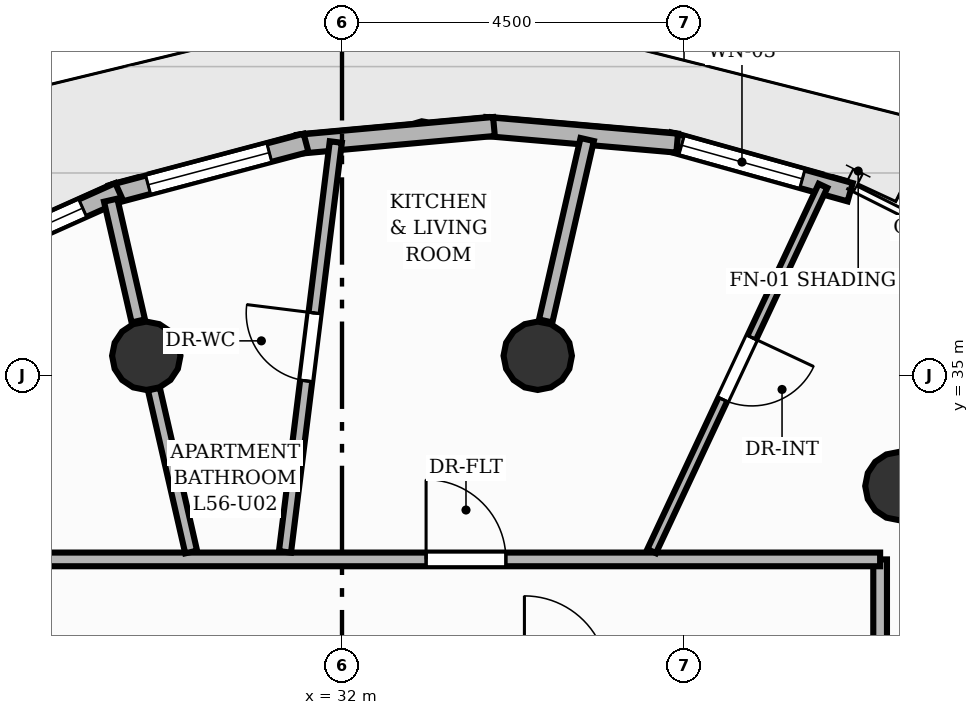
"""IFC4 building model, lengths in metres.
Left out: names, types, materials, properties, quantities, classifications, styles, units other than length and angle.
Written with IfcOpenShell. Run it as: python <this file> out.ifc"""

import sys

from ifc_helpers import new_model, si_unit, direction, frame, frame_2d, origin, origin_2d, place, context, subcontext, project, spatial, rectangle, circle, extrude, element, fill, save


model = new_model("IFC4")
c1 = context("Model", 3, precision=1e-05, world=origin(), true_north=direction((0.0, 1.0)))
c2 = subcontext(c1, "Body", "Model", "MODEL_VIEW")
j1 = project(units=[si_unit("LENGTHUNIT", "METRE"), si_unit("PLANEANGLEUNIT", "RADIAN")], contexts=[c1])
p1 = place(None, origin())
s1 = spatial("IfcSite", under=j1, at=p1, CompositionType="ELEMENT")
p2 = place(p1, origin())
s2 = spatial("IfcBuilding", under=s1, at=p2, CompositionType="ELEMENT")
p3 = place(p2, frame((0.0, 0.0, 188.64)))
s3 = spatial("IfcBuildingStorey", under=s2, at=p3, CompositionType="ELEMENT", Elevation=188.64)
for number, where, z_axis, x_axis in (
    (1, (39.333, 33.545, 0.0), (0.0, 0.0, 1.0), (1.0, 0.0, 0.0)),
    (2, (34.575, 35.26, 0.0), (0.0, 0.0, 1.0), (1.0, 0.0, 0.0)),
    (3, (29.425, 35.26, 0.0), (0.0, 0.0, 1.0), (1.0, 0.0, 0.0)),
):
    element("IfcColumn", number, at=place(p3, frame(where, z_axis=z_axis, x_axis=x_axis)), inside=s3, PredefinedType="COLUMN", context=c2, shape_type="SweptSolid", body=[
        extrude(circle(Radius=0.45, at=origin_2d()), origin(), (0.0, 0.0, 1.0), 3.2),
    ])
p4 = place(p3, frame((36.299, 38.077, 0.0), z_axis=(0.0, 0.0, 1.0), x_axis=(0.96316841201, -0.26889888454, 0.0)))
e4 = element("IfcWall", 4, at=p4, inside=s3, PredefinedType="SOLIDWALL", context=c2, shape_type="SweptSolid", body=[
    extrude(rectangle(XDim=2.478, YDim=0.25, at=frame_2d((1.239, 0.0))), origin(), (0.0, 0.0, 1.0), 2.96),
])
p5 = place(p4, frame((0.175, 0.0, 0.85)))
e5 = element("IfcOpeningElement", 5, at=p5, cuts=e4, PredefinedType="OPENING", context=c2, shape_type="SweptSolid", body=[
    extrude(rectangle(XDim=1.65, YDim=1.55, at=frame_2d((0.825, 0.775))), frame((0.0, 0.135, 0.0), z_axis=(0.0, -1.0, 0.0), x_axis=(1.0, 0.0, 0.0)), (0.0, 0.0, 1.0), 0.27),
])
p6 = place(p3, frame((33.888, 38.276, 0.0), z_axis=(0.0, 0.0, 1.0), x_axis=(0.996260822813, -0.08639660252, 0.0)))
e6 = element("IfcWall", 6, at=p6, inside=s3, PredefinedType="SOLIDWALL", context=c2, shape_type="SweptSolid", body=[
    extrude(rectangle(XDim=2.532, YDim=0.25, at=frame_2d((1.266, 0.0))), origin(), (0.0, 0.0, 1.0), 2.96),
])
p7 = place(p3, frame((31.418, 38.042, 0.0), z_axis=(0.0, 0.0, 1.0), x_axis=(0.995895522128, 0.090510270169, 0.0)))
e7 = element("IfcWall", 7, at=p7, inside=s3, PredefinedType="SOLIDWALL", context=c2, shape_type="SweptSolid", body=[
    extrude(rectangle(XDim=2.592, YDim=0.25, at=frame_2d((1.296, 0.0))), origin(), (0.0, 0.0, 1.0), 2.96),
])
p8 = place(p3, frame((28.965, 37.381, 0.0), z_axis=(0.0, 0.0, 1.0), x_axis=(0.96652474621, 0.256573410476, 0.0)))
e8 = element("IfcWall", 8, at=p8, inside=s3, PredefinedType="SOLIDWALL", context=c2, shape_type="SweptSolid", body=[
    extrude(rectangle(XDim=2.651, YDim=0.25, at=frame_2d((1.325, 0.0))), origin(), (0.0, 0.0, 1.0), 2.96),
])
p9 = place(p8, frame((0.501, 0.0, 0.85)))
e9 = element("IfcOpeningElement", 9, at=p9, cuts=e8, PredefinedType="OPENING", context=c2, shape_type="SweptSolid", body=[
    extrude(rectangle(XDim=1.65, YDim=1.55, at=frame_2d((0.825, 0.775))), frame((0.0, 0.135, 0.0), z_axis=(0.0, -1.0, 0.0), x_axis=(1.0, 0.0, 0.0)), (0.0, 0.0, 1.0), 0.27),
])
p10 = place(p3, frame((26.603, 36.313, 0.0), z_axis=(0.0, 0.0, 1.0), x_axis=(0.912615139532, 0.408819773368, 0.0)))
e10 = element("IfcWall", 10, at=p10, inside=s3, PredefinedType="SOLIDWALL", context=c2, shape_type="SweptSolid", body=[
    extrude(rectangle(XDim=2.702, YDim=0.25, at=frame_2d((1.351, 0.0))), origin(), (0.0, 0.0, 1.0), 2.96),
])
p11 = place(p10, frame((0.526, 0.0, 0.85)))
e11 = element("IfcOpeningElement", 11, at=p11, cuts=e10, PredefinedType="OPENING", context=c2, shape_type="SweptSolid", body=[
    extrude(rectangle(XDim=1.65, YDim=1.55, at=frame_2d((0.825, 0.775))), frame((0.0, 0.135, 0.0), z_axis=(0.0, -1.0, 0.0), x_axis=(1.0, 0.0, 0.0)), (0.0, 0.0, 1.0), 0.27),
])
p12 = place(p3, frame((34.68, 35.718, 0.0), z_axis=(0.0, 0.0, 1.0), x_axis=(0.222943921747, 0.974831271429, 0.0)))
e12 = element("IfcWall", 12, at=p12, inside=s3, PredefinedType="PARTITIONING", context=c2, shape_type="SweptSolid", body=[
    extrude(rectangle(XDim=2.448, YDim=0.18, at=frame_2d((1.224, 0.0))), origin(), (0.0, 0.0, 1.0), 2.404),
])
p13 = place(p3, frame((29.32, 35.718, 0.0), z_axis=(0.0, 0.0, 1.0), x_axis=(-0.222967107114, 0.974825968645, 0.0)))
e13 = element("IfcWall", 13, at=p13, inside=s3, PredefinedType="PARTITIONING", context=c2, shape_type="SweptSolid", body=[
    extrude(rectangle(XDim=1.63, YDim=0.18, at=frame_2d((0.815, 0.0))), origin(), (0.0, 0.0, 1.0), 2.404),
])
p14 = place(p3, frame((39.08, 32.58, 0.0), z_axis=(0.0, 0.0, 1.0), x_axis=(0.0, -1.0, 0.0)))
e14 = element("IfcWall", 14, at=p14, inside=s3, PredefinedType="PARTITIONING", context=c2, shape_type="SweptSolid", body=[
    extrude(rectangle(XDim=8.094, YDim=0.18, at=frame_2d((4.047, 0.0))), origin(), (0.0, 0.0, 1.0), 2.955),
])
p15 = place(p14, frame((5.174, 0.0, 0.0)))
e15 = element("IfcOpeningElement", 15, at=p15, cuts=e14, PredefinedType="OPENING", context=c2, shape_type="SweptSolid", body=[
    extrude(rectangle(XDim=0.9, YDim=2.1, at=frame_2d((0.45, 1.05))), frame((0.0, 0.1, 0.0), z_axis=(0.0, -1.0, 0.0), x_axis=(1.0, 0.0, 0.0)), (0.0, 0.0, 1.0), 0.2),
])
p16 = place(p3, frame((24.92, 32.58, 0.0), z_axis=(0.0, 0.0, 1.0), x_axis=(1.0, 0.0, 0.0)))
e16 = element("IfcWall", 16, at=p16, inside=s3, PredefinedType="PARTITIONING", context=c2, shape_type="SweptSolid", body=[
    extrude(rectangle(XDim=14.16, YDim=0.18, at=frame_2d((7.08, 0.0))), origin(), (0.0, 0.0, 1.0), 2.955),
])
p17 = place(p16, frame((8.186, 0.0, 0.0)))
e17 = element("IfcOpeningElement", 17, at=p17, cuts=e16, PredefinedType="OPENING", context=c2, shape_type="SweptSolid", body=[
    extrude(rectangle(XDim=1.05, YDim=2.15, at=frame_2d((0.525, 1.075))), frame((0.0, 0.1, 0.0), z_axis=(0.0, -1.0, 0.0), x_axis=(1.0, 0.0, 0.0)), (0.0, 0.0, 1.0), 0.2),
])
p18 = place(p16, frame((2.119, 0.0, 0.0)))
e18 = element("IfcOpeningElement", 18, at=p18, cuts=e16, PredefinedType="OPENING", context=c2, shape_type="SweptSolid", body=[
    extrude(rectangle(XDim=0.9, YDim=2.1, at=frame_2d((0.45, 1.05))), frame((0.0, 0.1, 0.0), z_axis=(0.0, -1.0, 0.0), x_axis=(1.0, 0.0, 0.0)), (0.0, 0.0, 1.0), 0.2),
])
p19 = place(p3, frame((31.25, 32.679, 0.0), z_axis=(0.0, 0.0, 1.0), x_axis=(0.123100196343, 0.992394247091, 0.0)))
e19 = element("IfcWall", 19, at=p19, inside=s3, PredefinedType="PLUMBINGWALL", context=c2, shape_type="SweptSolid", body=[
    extrude(rectangle(XDim=5.434, YDim=0.16, at=frame_2d((2.717, 0.0))), origin(), (0.0, 0.0, 1.0), 2.692),
])
p20 = place(p19, frame((2.267, 0.0, 0.0)))
e20 = element("IfcOpeningElement", 20, at=p20, cuts=e19, PredefinedType="OPENING", context=c2, shape_type="SweptSolid", body=[
    extrude(rectangle(XDim=0.9, YDim=2.1, at=frame_2d((0.45, 1.05))), frame((0.0, 0.09, 0.0), z_axis=(0.0, -1.0, 0.0), x_axis=(1.0, 0.0, 0.0)), (0.0, 0.0, 1.0), 0.18),
])
p21 = place(p3, frame((38.328, 37.496, 0.0), z_axis=(0.0, 0.0, 1.0), x_axis=(-0.424538730781, -0.905409777983, 0.0)))
e21 = element("IfcWall", 21, at=p21, inside=s3, PredefinedType="PARTITIONING", context=c2, shape_type="SweptSolid", body=[
    extrude(rectangle(XDim=5.309, YDim=0.125, at=frame_2d((2.655, 0.0))), origin(), (0.0, 0.0, 1.0), 2.955),
])
p22 = place(p21, frame((2.205, 0.0, 0.0)))
e22 = element("IfcOpeningElement", 22, at=p22, cuts=e21, PredefinedType="OPENING", context=c2, shape_type="SweptSolid", body=[
    extrude(rectangle(XDim=0.9, YDim=2.1, at=frame_2d((0.45, 1.05))), frame((0.0, 0.073, 0.0), z_axis=(0.0, -1.0, 0.0), x_axis=(1.0, 0.0, 0.0)), (0.0, 0.0, 1.0), 0.145),
])
p23 = place(p3, frame((30.015, 32.677, 0.0), z_axis=(0.0, 0.0, 1.0), x_axis=(-0.222969522248, 0.974825416241, 0.0)))
e23 = element("IfcWall", 23, at=p23, inside=s3, PredefinedType="PLUMBINGWALL", context=c2, shape_type="SweptSolid", body=[
    extrude(rectangle(XDim=2.199, YDim=0.16, at=frame_2d((1.099, 0.0))), origin(), (0.0, 0.0, 1.0), 2.404),
])
p24 = place(p5, origin())
e24 = element("IfcWindow", 24, at=p24, inside=s3, PartitioningType="SINGLE_PANEL", PredefinedType="WINDOW", context=c2, shape_type="SweptSolid", body=[
    extrude(rectangle(XDim=1.65, YDim=1.55, at=frame_2d((0.825, 0.775))), frame((0.0, 0.03, 0.0), z_axis=(0.0, -1.0, 0.0), x_axis=(1.0, 0.0, 0.0)), (0.0, 0.0, 1.0), 0.06),
])
fill(e5, e24)
p25 = place(p9, origin())
e25 = element("IfcWindow", 25, at=p25, inside=s3, PartitioningType="SINGLE_PANEL", PredefinedType="WINDOW", context=c2, shape_type="SweptSolid", body=[
    extrude(rectangle(XDim=1.65, YDim=1.55, at=frame_2d((0.825, 0.775))), frame((0.0, 0.03, 0.0), z_axis=(0.0, -1.0, 0.0), x_axis=(1.0, 0.0, 0.0)), (0.0, 0.0, 1.0), 0.06),
])
fill(e9, e25)
p26 = place(p11, origin())
e26 = element("IfcWindow", 26, at=p26, inside=s3, PartitioningType="SINGLE_PANEL", PredefinedType="WINDOW", context=c2, shape_type="SweptSolid", body=[
    extrude(rectangle(XDim=1.65, YDim=1.55, at=frame_2d((0.825, 0.775))), frame((0.0, 0.03, 0.0), z_axis=(0.0, -1.0, 0.0), x_axis=(1.0, 0.0, 0.0)), (0.0, 0.0, 1.0), 0.06),
])
fill(e11, e26)
p27 = place(p17, origin())
e27 = element("IfcDoor", 27, at=p27, inside=s3, OperationType="SINGLE_SWING_LEFT", PredefinedType="DOOR", context=c2, shape_type="SweptSolid", body=[
    extrude(rectangle(XDim=1.05, YDim=2.15, at=frame_2d((0.525, 1.075))), frame((0.0, 0.025, 0.0), z_axis=(0.0, -1.0, 0.0), x_axis=(1.0, 0.0, 0.0)), (0.0, 0.0, 1.0), 0.05),
])
fill(e17, e27)
p28 = place(p20, origin())
e28 = element("IfcDoor", 28, at=p28, inside=s3, OperationType="SINGLE_SWING_RIGHT", PredefinedType="DOOR", context=c2, shape_type="SweptSolid", body=[
    extrude(rectangle(XDim=0.9, YDim=2.1, at=frame_2d((0.45, 1.05))), frame((0.0, 0.025, 0.0), z_axis=(0.0, -1.0, 0.0), x_axis=(1.0, 0.0, 0.0)), (0.0, 0.0, 1.0), 0.05),
])
fill(e20, e28)
p29 = place(p22, origin())
e29 = element("IfcDoor", 29, at=p29, inside=s3, OperationType="SINGLE_SWING_LEFT", PredefinedType="DOOR", context=c2, shape_type="SweptSolid", body=[
    extrude(rectangle(XDim=0.9, YDim=2.1, at=frame_2d((0.45, 1.05))), frame((0.0, 0.025, 0.0), z_axis=(0.0, -1.0, 0.0), x_axis=(1.0, 0.0, 0.0)), (0.0, 0.0, 1.0), 0.05),
])
fill(e22, e29)
save(model, sys.argv[1])
